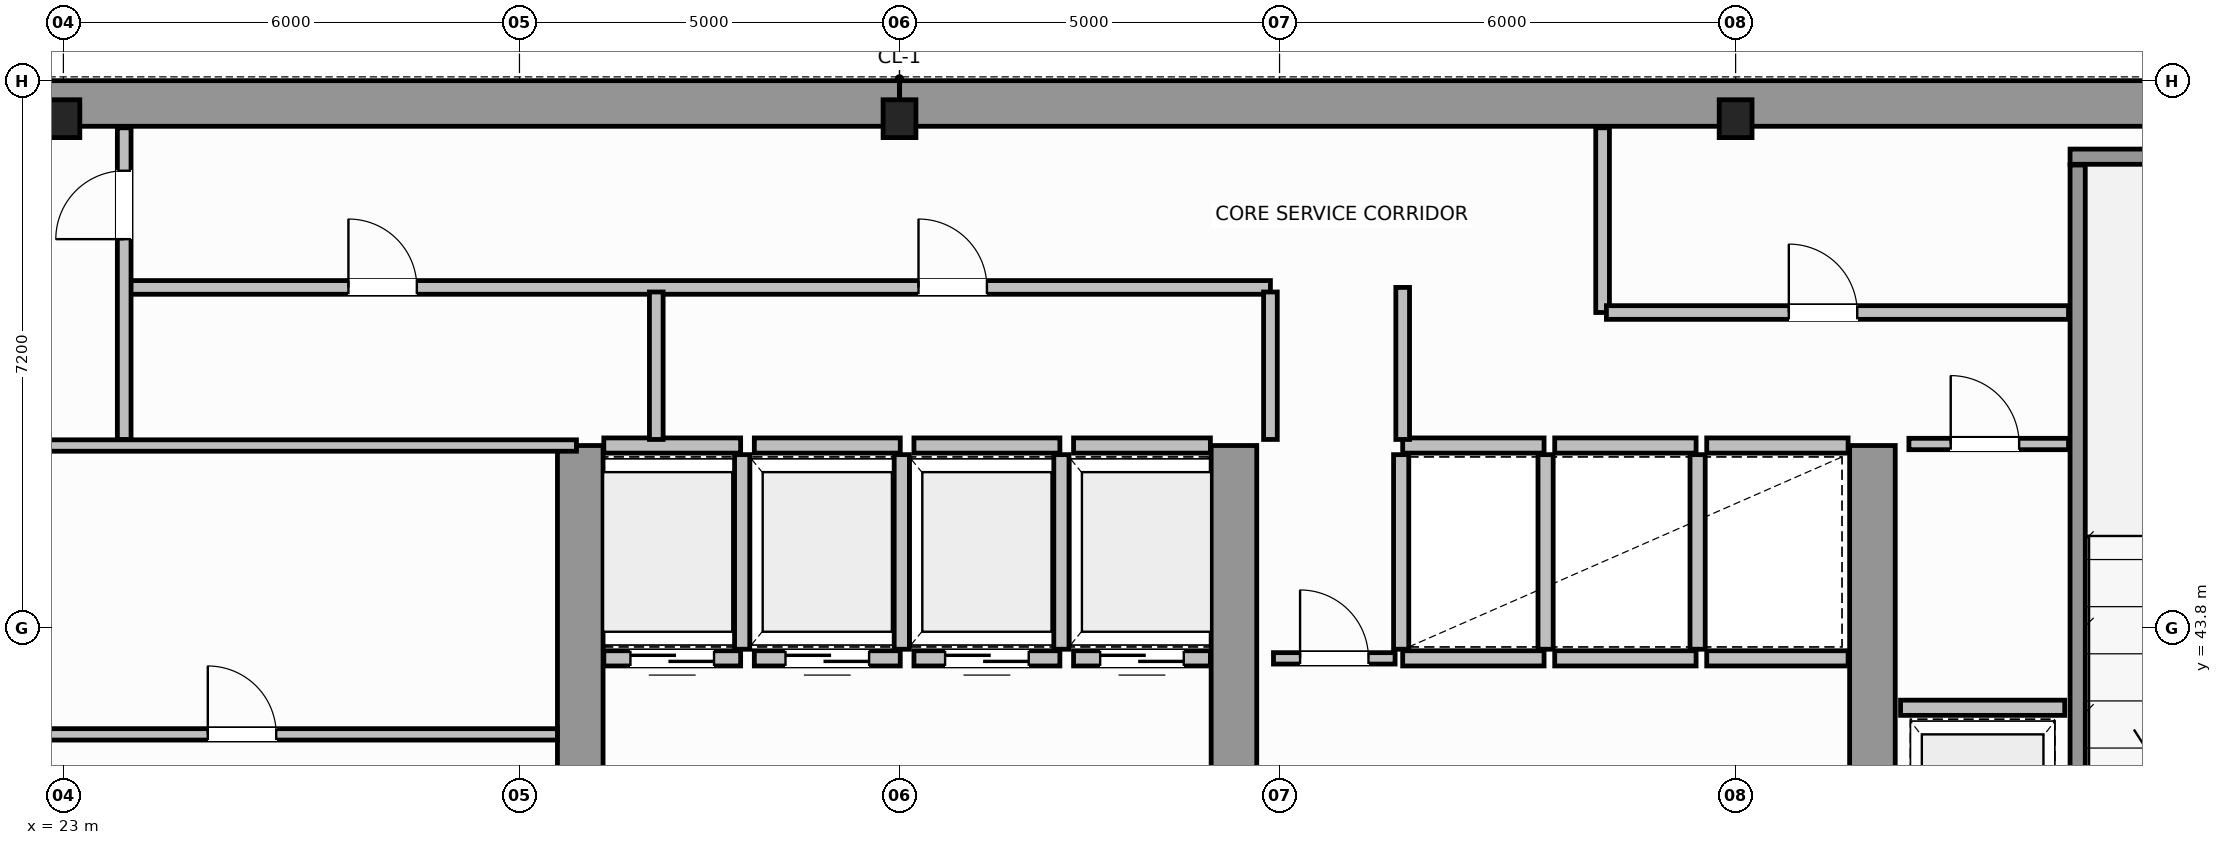
"""IFC4 building model, lengths in metres.
Left out: names, types, materials, properties, quantities, classifications, styles, units other than length and angle.
Written with IfcOpenShell. Run it as: python <this file> out.ifc"""

import sys

from ifc_helpers import new_model, si_unit, direction, frame, frame_2d, origin, origin_2d, place, context, subcontext, project, spatial, rectangle, i_section, extrude, source, transform, mapped, element, fill, save


model = new_model("IFC4")
c1 = context("Model", 3, precision=1e-05, world=origin(), true_north=direction((0.0, 1.0)))
c2 = subcontext(c1, "Body", "Model", "MODEL_VIEW")
j1 = project(units=[si_unit("LENGTHUNIT", "METRE"), si_unit("PLANEANGLEUNIT", "RADIAN")], contexts=[c1])
p1 = place(None, origin())
s1 = spatial("IfcSite", under=j1, at=p1, CompositionType="ELEMENT")
p2 = place(p1, origin())
s2 = spatial("IfcBuilding", under=s1, at=p2, CompositionType="ELEMENT")
p3 = place(p2, frame((0.0, 0.0, 184.2)))
s3 = spatial("IfcBuildingStorey", under=s2, at=p3, CompositionType="ELEMENT", Elevation=184.2)
m1 = source(origin(), c2, "Body", "SweptSolid", [
    extrude(i_section(OverallWidth=0.432, OverallDepth=0.498, WebThickness=0.055, FlangeThickness=0.068, FilletRadius=0.015, at=origin_2d()), origin(), (0.0, 0.0, 1.0), 3.8),
])
for number, where, z_axis, x_axis in (
    (1, (23.0, 50.5, 0.0), (0.0, 0.0, 1.0), (1.0, 0.0, 0.0)),
    (2, (34.0, 50.5, 0.0), (0.0, 0.0, 1.0), (1.0, 0.0, 0.0)),
    (3, (45.0, 50.5, 0.0), (0.0, 0.0, 1.0), (1.0, 0.0, 0.0)),
):
    element("IfcColumn", number, at=place(p3, frame(where, z_axis=z_axis, x_axis=x_axis)), inside=s3, PredefinedType="COLUMN", context=c2, shape_type="MappedRepresentation", body=[
        mapped(m1, transform((0.0, 0.0, 0.0), scale=1.0)),
    ])
for number, where, z_axis, x_axis in (
    (4, (14.304, 50.7, 0.0), (0.0, 0.0, 1.0), (1.0, 0.0, 0.0)),
    (5, (34.002, 50.7, 0.0), (0.0, 0.0, 1.0), (1.0, 0.0, 0.0)),
):
    element("IfcWall", number, at=place(p3, frame(where, z_axis=z_axis, x_axis=x_axis)), inside=s3, PredefinedType="SHEAR", context=c2, shape_type="SweptSolid", body=[
        extrude(rectangle(XDim=19.694, YDim=0.6, at=frame_2d((9.847, 0.0))), origin(), (0.0, 0.0, 1.0), 3.8),
    ])
for number, where, z_axis, x_axis in (
    (6, (29.8, 36.82, 0.0), (0.0, 0.0, 1.0), (0.0, 1.0, 0.0)),
    (7, (38.4, 36.82, 0.0), (0.0, 0.0, 1.0), (0.0, 1.0, 0.0)),
    (8, (46.8, 36.82, 0.0), (0.0, 0.0, 1.0), (0.0, 1.0, 0.0)),
):
    element("IfcWall", number, at=place(p3, frame(where, z_axis=z_axis, x_axis=x_axis)), inside=s3, PredefinedType="SHEAR", context=c2, shape_type="SweptSolid", body=[
        extrude(rectangle(XDim=9.38, YDim=0.6, at=frame_2d((4.69, 0.0))), origin(), (0.0, 0.0, 1.0), 3.8),
    ])
p4 = place(p3, frame((49.4, 50.0, 0.0), z_axis=(0.0, 0.0, 1.0), x_axis=(1.0, 0.0, 0.0)))
e9 = element("IfcWall", 9, at=p4, inside=s3, PredefinedType="SOLIDWALL", context=c2, shape_type="SweptSolid", body=[
    extrude(rectangle(XDim=4.3, YDim=0.2, at=frame_2d((2.15, 0.0))), origin(), (0.0, 0.0, 1.0), 3.8),
])
p5 = place(p3, frame((49.5, 39.96, 0.0), z_axis=(0.0, 0.0, 1.0), x_axis=(0.0, 1.0, 0.0)))
e10 = element("IfcWall", 10, at=p5, inside=s3, PredefinedType="SOLIDWALL", context=c2, shape_type="SweptSolid", body=[
    extrude(rectangle(XDim=9.93, YDim=0.2, at=frame_2d((4.965, 0.0))), origin(), (0.0, 0.0, 1.0), 3.8),
])
p6 = place(p3, frame((30.11, 43.4, 0.0), z_axis=(0.0, 0.0, 1.0), x_axis=(1.0, 0.0, 0.0)))
e11 = element("IfcWall", 11, at=p6, inside=s3, PredefinedType="SOLIDWALL", context=c2, shape_type="SweptSolid", body=[
    extrude(rectangle(XDim=1.8, YDim=0.2, at=frame_2d((0.9, 0.0))), origin(), (0.0, 0.0, 1.0), 3.58),
])
p7 = place(p6, frame((0.35, 0.0, 0.0)))
e12 = element("IfcOpeningElement", 12, at=p7, cuts=e11, PredefinedType="OPENING", context=c2, shape_type="SweptSolid", body=[
    extrude(rectangle(XDim=1.1, YDim=2.15, at=frame_2d((0.55, 1.075))), frame((0.0, 0.11, 0.0), z_axis=(0.0, -1.0, 0.0), x_axis=(1.0, 0.0, 0.0)), (0.0, 0.0, 1.0), 0.22),
])
p8 = place(p3, frame((30.11, 46.2, 0.0), z_axis=(0.0, 0.0, 1.0), x_axis=(1.0, 0.0, 0.0)))
e13 = element("IfcWall", 13, at=p8, inside=s3, PredefinedType="SOLIDWALL", context=c2, shape_type="SweptSolid", body=[
    extrude(rectangle(XDim=1.8, YDim=0.2, at=frame_2d((0.9, 0.0))), origin(), (0.0, 0.0, 1.0), 3.58),
])
p9 = place(p3, frame((31.93, 43.52, 0.0), z_axis=(0.0, 0.0, 1.0), x_axis=(0.0, 1.0, 0.0)))
e14 = element("IfcWall", 14, at=p9, inside=s3, PredefinedType="SOLIDWALL", context=c2, shape_type="SweptSolid", body=[
    extrude(rectangle(XDim=2.56, YDim=0.2, at=frame_2d((1.28, 0.0))), origin(), (0.0, 0.0, 1.0), 3.58),
])
p10 = place(p3, frame((32.09, 43.4, 0.0), z_axis=(0.0, 0.0, 1.0), x_axis=(1.0, 0.0, 0.0)))
e15 = element("IfcWall", 15, at=p10, inside=s3, PredefinedType="SOLIDWALL", context=c2, shape_type="SweptSolid", body=[
    extrude(rectangle(XDim=1.92, YDim=0.2, at=frame_2d((0.96, 0.0))), origin(), (0.0, 0.0, 1.0), 3.58),
])
p11 = place(p10, frame((0.41, 0.0, 0.0)))
e16 = element("IfcOpeningElement", 16, at=p11, cuts=e15, PredefinedType="OPENING", context=c2, shape_type="SweptSolid", body=[
    extrude(rectangle(XDim=1.1, YDim=2.15, at=frame_2d((0.55, 1.075))), frame((0.0, 0.11, 0.0), z_axis=(0.0, -1.0, 0.0), x_axis=(1.0, 0.0, 0.0)), (0.0, 0.0, 1.0), 0.22),
])
p12 = place(p3, frame((32.09, 46.2, 0.0), z_axis=(0.0, 0.0, 1.0), x_axis=(1.0, 0.0, 0.0)))
e17 = element("IfcWall", 17, at=p12, inside=s3, PredefinedType="SOLIDWALL", context=c2, shape_type="SweptSolid", body=[
    extrude(rectangle(XDim=1.92, YDim=0.2, at=frame_2d((0.96, 0.0))), origin(), (0.0, 0.0, 1.0), 3.58),
])
p13 = place(p3, frame((34.03, 43.52, 0.0), z_axis=(0.0, 0.0, 1.0), x_axis=(0.0, 1.0, 0.0)))
e18 = element("IfcWall", 18, at=p13, inside=s3, PredefinedType="SOLIDWALL", context=c2, shape_type="SweptSolid", body=[
    extrude(rectangle(XDim=2.56, YDim=0.2, at=frame_2d((1.28, 0.0))), origin(), (0.0, 0.0, 1.0), 3.58),
])
p14 = place(p3, frame((34.19, 43.4, 0.0), z_axis=(0.0, 0.0, 1.0), x_axis=(1.0, 0.0, 0.0)))
e19 = element("IfcWall", 19, at=p14, inside=s3, PredefinedType="SOLIDWALL", context=c2, shape_type="SweptSolid", body=[
    extrude(rectangle(XDim=1.92, YDim=0.2, at=frame_2d((0.96, 0.0))), origin(), (0.0, 0.0, 1.0), 3.58),
])
p15 = place(p14, frame((0.41, 0.0, 0.0)))
e20 = element("IfcOpeningElement", 20, at=p15, cuts=e19, PredefinedType="OPENING", context=c2, shape_type="SweptSolid", body=[
    extrude(rectangle(XDim=1.1, YDim=2.15, at=frame_2d((0.55, 1.075))), frame((0.0, 0.11, 0.0), z_axis=(0.0, -1.0, 0.0), x_axis=(1.0, 0.0, 0.0)), (0.0, 0.0, 1.0), 0.22),
])
p16 = place(p3, frame((34.19, 46.2, 0.0), z_axis=(0.0, 0.0, 1.0), x_axis=(1.0, 0.0, 0.0)))
e21 = element("IfcWall", 21, at=p16, inside=s3, PredefinedType="SOLIDWALL", context=c2, shape_type="SweptSolid", body=[
    extrude(rectangle(XDim=1.92, YDim=0.2, at=frame_2d((0.96, 0.0))), origin(), (0.0, 0.0, 1.0), 3.58),
])
p17 = place(p3, frame((36.13, 43.52, 0.0), z_axis=(0.0, 0.0, 1.0), x_axis=(0.0, 1.0, 0.0)))
e22 = element("IfcWall", 22, at=p17, inside=s3, PredefinedType="SOLIDWALL", context=c2, shape_type="SweptSolid", body=[
    extrude(rectangle(XDim=2.56, YDim=0.2, at=frame_2d((1.28, 0.0))), origin(), (0.0, 0.0, 1.0), 3.58),
])
p18 = place(p3, frame((36.29, 43.4, 0.0), z_axis=(0.0, 0.0, 1.0), x_axis=(1.0, 0.0, 0.0)))
e23 = element("IfcWall", 23, at=p18, inside=s3, PredefinedType="SOLIDWALL", context=c2, shape_type="SweptSolid", body=[
    extrude(rectangle(XDim=1.8, YDim=0.2, at=frame_2d((0.9, 0.0))), origin(), (0.0, 0.0, 1.0), 3.58),
])
p19 = place(p18, frame((0.35, 0.0, 0.0)))
e24 = element("IfcOpeningElement", 24, at=p19, cuts=e23, PredefinedType="OPENING", context=c2, shape_type="SweptSolid", body=[
    extrude(rectangle(XDim=1.1, YDim=2.15, at=frame_2d((0.55, 1.075))), frame((0.0, 0.11, 0.0), z_axis=(0.0, -1.0, 0.0), x_axis=(1.0, 0.0, 0.0)), (0.0, 0.0, 1.0), 0.22),
])
p20 = place(p3, frame((36.29, 46.2, 0.0), z_axis=(0.0, 0.0, 1.0), x_axis=(1.0, 0.0, 0.0)))
e25 = element("IfcWall", 25, at=p20, inside=s3, PredefinedType="SOLIDWALL", context=c2, shape_type="SweptSolid", body=[
    extrude(rectangle(XDim=1.8, YDim=0.2, at=frame_2d((0.9, 0.0))), origin(), (0.0, 0.0, 1.0), 3.58),
])
for number, where, z_axis, x_axis in (
    (26, (40.62, 43.4, 0.0), (0.0, 0.0, 1.0), (1.0, 0.0, 0.0)),
    (27, (40.62, 46.2, 0.0), (0.0, 0.0, 1.0), (1.0, 0.0, 0.0)),
):
    element("IfcWall", number, at=place(p3, frame(where, z_axis=z_axis, x_axis=x_axis)), inside=s3, PredefinedType="SOLIDWALL", context=c2, shape_type="SweptSolid", body=[
        extrude(rectangle(XDim=1.86, YDim=0.2, at=frame_2d((0.93, 0.0))), origin(), (0.0, 0.0, 1.0), 3.58),
    ])
for number, where, z_axis, x_axis in (
    (28, (40.6, 43.52, 0.0), (0.0, 0.0, 1.0), (0.0, 1.0, 0.0)),
    (29, (42.5, 43.52, 0.0), (0.0, 0.0, 1.0), (0.0, 1.0, 0.0)),
):
    element("IfcWall", number, at=place(p3, frame(where, z_axis=z_axis, x_axis=x_axis)), inside=s3, PredefinedType="SOLIDWALL", context=c2, shape_type="SweptSolid", body=[
        extrude(rectangle(XDim=2.56, YDim=0.2, at=frame_2d((1.28, 0.0))), origin(), (0.0, 0.0, 1.0), 3.58),
    ])
for number, where, z_axis, x_axis in (
    (30, (42.62, 43.4, 0.0), (0.0, 0.0, 1.0), (1.0, 0.0, 0.0)),
    (31, (42.62, 46.2, 0.0), (0.0, 0.0, 1.0), (1.0, 0.0, 0.0)),
):
    element("IfcWall", number, at=place(p3, frame(where, z_axis=z_axis, x_axis=x_axis)), inside=s3, PredefinedType="SOLIDWALL", context=c2, shape_type="SweptSolid", body=[
        extrude(rectangle(XDim=1.86, YDim=0.2, at=frame_2d((0.93, 0.0))), origin(), (0.0, 0.0, 1.0), 3.58),
    ])
p21 = place(p3, frame((44.5, 43.52, 0.0), z_axis=(0.0, 0.0, 1.0), x_axis=(0.0, 1.0, 0.0)))
e32 = element("IfcWall", 32, at=p21, inside=s3, PredefinedType="SOLIDWALL", context=c2, shape_type="SweptSolid", body=[
    extrude(rectangle(XDim=2.56, YDim=0.2, at=frame_2d((1.28, 0.0))), origin(), (0.0, 0.0, 1.0), 3.58),
])
for number, where, z_axis, x_axis in (
    (33, (44.62, 43.4, 0.0), (0.0, 0.0, 1.0), (1.0, 0.0, 0.0)),
    (34, (44.62, 46.2, 0.0), (0.0, 0.0, 1.0), (1.0, 0.0, 0.0)),
):
    element("IfcWall", number, at=place(p3, frame(where, z_axis=z_axis, x_axis=x_axis)), inside=s3, PredefinedType="SOLIDWALL", context=c2, shape_type="SweptSolid", body=[
        extrude(rectangle(XDim=1.86, YDim=0.2, at=frame_2d((0.93, 0.0))), origin(), (0.0, 0.0, 1.0), 3.58),
    ])
p22 = place(p3, frame((47.17, 42.75, 0.0), z_axis=(0.0, 0.0, 1.0), x_axis=(1.0, 0.0, 0.0)))
e35 = element("IfcWall", 35, at=p22, inside=s3, PredefinedType="SOLIDWALL", context=c2, shape_type="SweptSolid", body=[
    extrude(rectangle(XDim=2.16, YDim=0.2, at=frame_2d((1.08, 0.0))), origin(), (0.0, 0.0, 1.0), 3.58),
])
p23 = place(p3, frame((21.25, 46.2, 0.0), z_axis=(0.0, 0.0, 1.0), x_axis=(1.0, 0.0, 0.0)))
e36 = element("IfcWall", 36, at=p23, inside=s3, PredefinedType="PARTITIONING", context=c2, shape_type="SweptSolid", body=[
    extrude(rectangle(XDim=8.5, YDim=0.15, at=frame_2d((4.25, 0.0))), origin(), (0.0, 0.0, 1.0), 3.58),
])
p24 = place(p3, frame((21.5, 42.4, 0.0), z_axis=(0.0, 0.0, 1.0), x_axis=(1.0, 0.0, 0.0)))
e37 = element("IfcWall", 37, at=p24, inside=s3, PredefinedType="PARTITIONING", context=c2, shape_type="SweptSolid", body=[
    extrude(rectangle(XDim=8.0, YDim=0.15, at=frame_2d((4.0, 0.0))), origin(), (0.0, 0.0, 1.0), 3.58),
])
p25 = place(p24, frame((3.4, 0.0, 0.0)))
e38 = element("IfcOpeningElement", 38, at=p25, cuts=e37, PredefinedType="OPENING", context=c2, shape_type="SweptSolid", body=[
    extrude(rectangle(XDim=0.9, YDim=2.1, at=frame_2d((0.45, 1.05))), frame((0.0, 0.085, 0.0), z_axis=(0.0, -1.0, 0.0), x_axis=(1.0, 0.0, 0.0)), (0.0, 0.0, 1.0), 0.17),
])
p26 = place(p3, frame((47.28, 46.22, 0.0), z_axis=(0.0, 0.0, 1.0), x_axis=(1.0, 0.0, 0.0)))
e39 = element("IfcWall", 39, at=p26, inside=s3, PredefinedType="PARTITIONING", context=c2, shape_type="SweptSolid", body=[
    extrude(rectangle(XDim=2.1, YDim=0.15, at=frame_2d((1.05, 0.0))), origin(), (0.0, 0.0, 1.0), 3.58),
])
p27 = place(p26, frame((0.55, 0.0, 0.0)))
e40 = element("IfcOpeningElement", 40, at=p27, cuts=e39, PredefinedType="OPENING", context=c2, shape_type="SweptSolid", body=[
    extrude(rectangle(XDim=0.9, YDim=2.1, at=frame_2d((0.45, 1.05))), frame((0.0, 0.085, 0.0), z_axis=(0.0, -1.0, 0.0), x_axis=(1.0, 0.0, 0.0)), (0.0, 0.0, 1.0), 0.17),
])
p28 = place(p3, frame((38.92, 43.4, 0.0), z_axis=(0.0, 0.0, 1.0), x_axis=(1.0, 0.0, 0.0)))
e41 = element("IfcWall", 41, at=p28, inside=s3, PredefinedType="PARTITIONING", context=c2, shape_type="SweptSolid", body=[
    extrude(rectangle(XDim=1.6, YDim=0.15, at=frame_2d((0.8, 0.0))), origin(), (0.0, 0.0, 1.0), 3.58),
])
p29 = place(p28, frame((0.35, 0.0, 0.0)))
e42 = element("IfcOpeningElement", 42, at=p29, cuts=e41, PredefinedType="OPENING", context=c2, shape_type="SweptSolid", body=[
    extrude(rectangle(XDim=0.9, YDim=2.1, at=frame_2d((0.45, 1.05))), frame((0.0, 0.085, 0.0), z_axis=(0.0, -1.0, 0.0), x_axis=(1.0, 0.0, 0.0)), (0.0, 0.0, 1.0), 0.17),
])
p30 = place(p3, frame((23.85, 48.28, 0.0), z_axis=(0.0, 0.0, 1.0), x_axis=(1.0, 0.0, 0.0)))
e43 = element("IfcWall", 43, at=p30, inside=s3, PredefinedType="PLUMBINGWALL", context=c2, shape_type="SweptSolid", body=[
    extrude(rectangle(XDim=15.03, YDim=0.18, at=frame_2d((7.515, 0.0))), origin(), (0.0, 0.0, 1.0), 3.58),
])
p31 = place(p30, frame((2.9, 0.0, 0.0)))
e44 = element("IfcOpeningElement", 44, at=p31, cuts=e43, PredefinedType="OPENING", context=c2, shape_type="SweptSolid", body=[
    extrude(rectangle(XDim=0.9, YDim=2.15, at=frame_2d((0.45, 1.075))), frame((0.0, 0.1, 0.0), z_axis=(0.0, -1.0, 0.0), x_axis=(1.0, 0.0, 0.0)), (0.0, 0.0, 1.0), 0.2),
])
p32 = place(p30, frame((10.4, 0.0, 0.0)))
e45 = element("IfcOpeningElement", 45, at=p32, cuts=e43, PredefinedType="OPENING", context=c2, shape_type="SweptSolid", body=[
    extrude(rectangle(XDim=0.9, YDim=2.15, at=frame_2d((0.45, 1.075))), frame((0.0, 0.1, 0.0), z_axis=(0.0, -1.0, 0.0), x_axis=(1.0, 0.0, 0.0)), (0.0, 0.0, 1.0), 0.2),
])
p33 = place(p3, frame((23.8, 46.28, 0.0), z_axis=(0.0, 0.0, 1.0), x_axis=(0.0, 1.0, 0.0)))
e46 = element("IfcWall", 46, at=p33, inside=s3, PredefinedType="PLUMBINGWALL", context=c2, shape_type="SweptSolid", body=[
    extrude(rectangle(XDim=4.1, YDim=0.18, at=frame_2d((2.05, 0.0))), origin(), (0.0, 0.0, 1.0), 3.58),
])
p34 = place(p33, frame((2.635, 0.0, 0.0)))
e47 = element("IfcOpeningElement", 47, at=p34, cuts=e46, PredefinedType="OPENING", context=c2, shape_type="SweptSolid", body=[
    extrude(rectangle(XDim=0.9, YDim=2.15, at=frame_2d((0.45, 1.075))), frame((0.0, 0.1, 0.0), z_axis=(0.0, -1.0, 0.0), x_axis=(1.0, 0.0, 0.0)), (0.0, 0.0, 1.0), 0.2),
])
for number, where, z_axis, x_axis in (
    (48, (30.8, 46.28, 0.0), (0.0, 0.0, 1.0), (0.0, 1.0, 0.0)),
    (49, (38.88, 46.28, 0.0), (0.0, 0.0, 1.0), (0.0, 1.0, 0.0)),
):
    element("IfcWall", number, at=place(p3, frame(where, z_axis=z_axis, x_axis=x_axis)), inside=s3, PredefinedType="PLUMBINGWALL", context=c2, shape_type="SweptSolid", body=[
        extrude(rectangle(XDim=1.94, YDim=0.18, at=frame_2d((0.97, 0.0))), origin(), (0.0, 0.0, 1.0), 3.58),
    ])
p35 = place(p3, frame((40.62, 46.28, 0.0), z_axis=(0.0, 0.0, 1.0), x_axis=(0.0, 1.0, 0.0)))
e50 = element("IfcWall", 50, at=p35, inside=s3, PredefinedType="PLUMBINGWALL", context=c2, shape_type="SweptSolid", body=[
    extrude(rectangle(XDim=2.0, YDim=0.18, at=frame_2d((1.0, 0.0))), origin(), (0.0, 0.0, 1.0), 3.58),
])
p36 = place(p3, frame((43.25, 47.95, 0.0), z_axis=(0.0, 0.0, 1.0), x_axis=(0.0, 1.0, 0.0)))
e51 = element("IfcWall", 51, at=p36, inside=s3, PredefinedType="PLUMBINGWALL", context=c2, shape_type="SweptSolid", body=[
    extrude(rectangle(XDim=2.43, YDim=0.18, at=frame_2d((1.215, 0.0))), origin(), (0.0, 0.0, 1.0), 3.58),
])
p37 = place(p3, frame((43.3, 47.95, 0.0), z_axis=(0.0, 0.0, 1.0), x_axis=(1.0, 0.0, 0.0)))
e52 = element("IfcWall", 52, at=p37, inside=s3, PredefinedType="PLUMBINGWALL", context=c2, shape_type="SweptSolid", body=[
    extrude(rectangle(XDim=6.08, YDim=0.18, at=frame_2d((3.04, 0.0))), origin(), (0.0, 0.0, 1.0), 3.58),
])
p38 = place(p37, frame((2.4, 0.0, 0.0)))
e53 = element("IfcOpeningElement", 53, at=p38, cuts=e52, PredefinedType="OPENING", context=c2, shape_type="SweptSolid", body=[
    extrude(rectangle(XDim=0.9, YDim=2.15, at=frame_2d((0.45, 1.075))), frame((0.0, 0.1, 0.0), z_axis=(0.0, -1.0, 0.0), x_axis=(1.0, 0.0, 0.0)), (0.0, 0.0, 1.0), 0.2),
])
m2 = source(origin(), c2, "Body", "SweptSolid", [
    extrude(rectangle(XDim=1.1, YDim=2.15, at=frame_2d((0.55, 1.075))), frame((0.0, 0.025, 0.0), z_axis=(0.0, -1.0, 0.0), x_axis=(1.0, 0.0, 0.0)), (0.0, 0.0, 1.0), 0.05),
])
p39 = place(p7, origin())
e54 = element("IfcDoor", 54, at=p39, inside=s3, OperationType="DOUBLE_DOOR_SLIDING", PredefinedType="DOOR", context=c2, shape_type="MappedRepresentation", body=[
    mapped(m2, transform((0.0, 0.0, 0.0), scale=1.0)),
])
fill(e12, e54)
p40 = place(p11, origin())
e55 = element("IfcDoor", 55, at=p40, inside=s3, OperationType="DOUBLE_DOOR_SLIDING", PredefinedType="DOOR", context=c2, shape_type="MappedRepresentation", body=[
    mapped(m2, transform((0.0, 0.0, 0.0), scale=1.0)),
])
fill(e16, e55)
p41 = place(p15, origin())
e56 = element("IfcDoor", 56, at=p41, inside=s3, OperationType="DOUBLE_DOOR_SLIDING", PredefinedType="DOOR", context=c2, shape_type="MappedRepresentation", body=[
    mapped(m2, transform((0.0, 0.0, 0.0), scale=1.0)),
])
fill(e20, e56)
p42 = place(p19, origin())
e57 = element("IfcDoor", 57, at=p42, inside=s3, OperationType="DOUBLE_DOOR_SLIDING", PredefinedType="DOOR", context=c2, shape_type="MappedRepresentation", body=[
    mapped(m2, transform((0.0, 0.0, 0.0), scale=1.0)),
])
fill(e24, e57)
m3 = source(origin(), c2, "Body", "SweptSolid", [
    extrude(rectangle(XDim=0.9, YDim=2.1, at=frame_2d((0.45, 1.05))), frame((0.0, 0.025, 0.0), z_axis=(0.0, -1.0, 0.0), x_axis=(1.0, 0.0, 0.0)), (0.0, 0.0, 1.0), 0.05),
])
p43 = place(p25, origin())
e58 = element("IfcDoor", 58, at=p43, inside=s3, OperationType="SINGLE_SWING_RIGHT", PredefinedType="DOOR", context=c2, shape_type="MappedRepresentation", body=[
    mapped(m3, transform((0.0, 0.0, 0.0), scale=1.0)),
])
fill(e38, e58)
p44 = place(p27, origin())
e59 = element("IfcDoor", 59, at=p44, inside=s3, OperationType="SINGLE_SWING_RIGHT", PredefinedType="DOOR", context=c2, shape_type="MappedRepresentation", body=[
    mapped(m3, transform((0.0, 0.0, 0.0), scale=1.0)),
])
fill(e40, e59)
p45 = place(p29, origin())
e60 = element("IfcDoor", 60, at=p45, inside=s3, OperationType="SINGLE_SWING_LEFT", PredefinedType="DOOR", context=c2, shape_type="MappedRepresentation", body=[
    mapped(m3, transform((0.0, 0.0, 0.0), scale=1.0)),
])
fill(e42, e60)
m4 = source(origin(), c2, "Body", "SweptSolid", [
    extrude(rectangle(XDim=0.9, YDim=2.15, at=frame_2d((0.45, 1.075))), frame((0.0, 0.025, 0.0), z_axis=(0.0, -1.0, 0.0), x_axis=(1.0, 0.0, 0.0)), (0.0, 0.0, 1.0), 0.05),
])
p46 = place(p34, origin())
e61 = element("IfcDoor", 61, at=p46, inside=s3, OperationType="SINGLE_SWING_LEFT", PredefinedType="DOOR", context=c2, shape_type="MappedRepresentation", body=[
    mapped(m4, transform((0.0, 0.0, 0.0), scale=1.0)),
])
fill(e47, e61)
p47 = place(p31, origin())
e62 = element("IfcDoor", 62, at=p47, inside=s3, OperationType="SINGLE_SWING_RIGHT", PredefinedType="DOOR", context=c2, shape_type="MappedRepresentation", body=[
    mapped(m4, transform((0.0, 0.0, 0.0), scale=1.0)),
])
fill(e44, e62)
p48 = place(p32, origin())
e63 = element("IfcDoor", 63, at=p48, inside=s3, OperationType="SINGLE_SWING_LEFT", PredefinedType="DOOR", context=c2, shape_type="MappedRepresentation", body=[
    mapped(m4, transform((0.0, 0.0, 0.0), scale=1.0)),
])
fill(e45, e63)
p49 = place(p38, origin())
e64 = element("IfcDoor", 64, at=p49, inside=s3, OperationType="SINGLE_SWING_RIGHT", PredefinedType="DOOR", context=c2, shape_type="MappedRepresentation", body=[
    mapped(m4, transform((0.0, 0.0, 0.0), scale=1.0)),
])
fill(e53, e64)
save(model, sys.argv[1])
